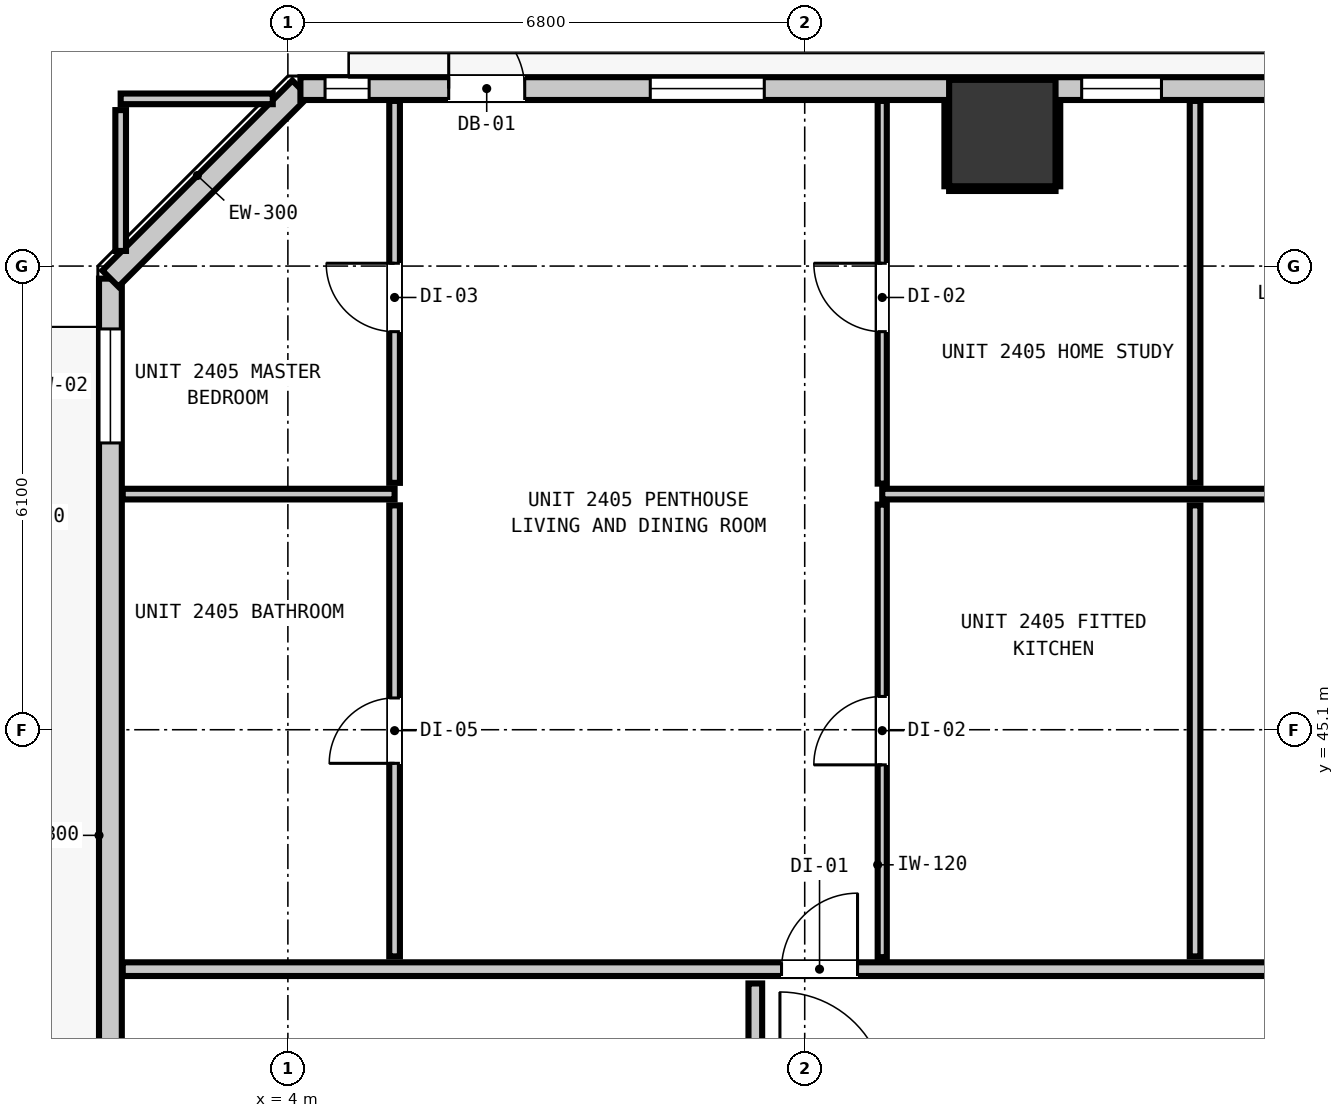
"""IFC4 building model, lengths in metres.
Left out: names, types, materials, properties, quantities, classifications, styles, units other than length and angle.
Written with IfcOpenShell. Run it as: python <this file> out.ifc"""

import sys

from ifc_helpers import new_model, si_unit, direction, frame, frame_2d, origin, origin_2d, place, context, subcontext, project, spatial, rectangle, extrude, element, fill, save


model = new_model("IFC4")
c1 = context("Model", 3, precision=1e-05, world=origin(), true_north=direction((0.0, 1.0)))
c2 = subcontext(c1, "Body", "Model", "MODEL_VIEW")
j1 = project(units=[si_unit("LENGTHUNIT", "METRE"), si_unit("PLANEANGLEUNIT", "RADIAN")], contexts=[c1])
p1 = place(None, origin())
s1 = spatial("IfcSite", under=j1, at=p1, CompositionType="ELEMENT")
p2 = place(p1, origin())
s2 = spatial("IfcBuilding", under=s1, at=p2, CompositionType="ELEMENT")
p3 = place(p2, frame((0.0, 0.0, 85.08)))
s3 = spatial("IfcBuildingStorey", under=s2, at=p3, CompositionType="ELEMENT", Elevation=85.08)
p4 = place(p3, frame((13.4, 52.95, 0.0), z_axis=(0.0, 0.0, 1.0), x_axis=(1.0, 0.0, 0.0)))
e1 = element("IfcColumn", 1, at=p4, inside=s3, PredefinedType="COLUMN", context=c2, shape_type="SweptSolid", body=[
    extrude(rectangle(XDim=1.4, YDim=1.4, at=origin_2d()), origin(), (0.0, 0.0, 1.0), 3.32),
])
p5 = place(p3, frame((1.665, 16.365, 0.0), z_axis=(0.0, 0.0, 1.0), x_axis=(0.0, 1.0, 0.0)))
e2 = element("IfcWall", 2, at=p5, inside=s3, PredefinedType="STANDARD", context=c2, shape_type="SweptSolid", body=[
    extrude(rectangle(XDim=34.67, YDim=0.3, at=frame_2d((17.335, 0.0))), origin(), (0.0, 0.0, 1.0), 2.96),
])
p6 = place(p5, frame((1.251, 0.0, 0.0)))
e3 = element("IfcOpeningElement", 3, at=p6, cuts=e2, PredefinedType="OPENING", context=c2, shape_type="SweptSolid", body=[
    extrude(rectangle(XDim=1.0, YDim=2.15, at=frame_2d((0.5, 1.075))), frame((0.0, 0.16, 0.0), z_axis=(0.0, -1.0, 0.0), x_axis=(1.0, 0.0, 0.0)), (0.0, 0.0, 1.0), 0.32),
])
p7 = place(p5, frame((32.508, 0.0, 0.85)))
e4 = element("IfcOpeningElement", 4, at=p7, cuts=e2, PredefinedType="OPENING", context=c2, shape_type="SweptSolid", body=[
    extrude(rectangle(XDim=1.5, YDim=1.8, at=frame_2d((0.75, 0.9))), frame((0.0, 0.16, 0.0), z_axis=(0.0, -1.0, 0.0), x_axis=(1.0, 0.0, 0.0)), (0.0, 0.0, 1.0), 0.32),
])
p8 = place(p5, frame((8.323, 0.0, 0.85)))
e5 = element("IfcOpeningElement", 5, at=p8, cuts=e2, PredefinedType="OPENING", context=c2, shape_type="SweptSolid", body=[
    extrude(rectangle(XDim=1.5, YDim=1.8, at=frame_2d((0.75, 0.9))), frame((0.0, 0.16, 0.0), z_axis=(0.0, -1.0, 0.0), x_axis=(1.0, 0.0, 0.0)), (0.0, 0.0, 1.0), 0.32),
])
p9 = place(p5, frame((11.473, 0.0, 0.85)))
e6 = element("IfcOpeningElement", 6, at=p9, cuts=e2, PredefinedType="OPENING", context=c2, shape_type="SweptSolid", body=[
    extrude(rectangle(XDim=1.5, YDim=1.8, at=frame_2d((0.75, 0.9))), frame((0.0, 0.16, 0.0), z_axis=(0.0, -1.0, 0.0), x_axis=(1.0, 0.0, 0.0)), (0.0, 0.0, 1.0), 0.32),
])
p10 = place(p5, frame((17.857, 0.0, 0.85)))
e7 = element("IfcOpeningElement", 7, at=p10, cuts=e2, PredefinedType="OPENING", context=c2, shape_type="SweptSolid", body=[
    extrude(rectangle(XDim=1.5, YDim=1.8, at=frame_2d((0.75, 0.9))), frame((0.0, 0.16, 0.0), z_axis=(0.0, -1.0, 0.0), x_axis=(1.0, 0.0, 0.0)), (0.0, 0.0, 1.0), 0.32),
])
p11 = place(p5, frame((21.133, 0.0, 0.85)))
e8 = element("IfcOpeningElement", 8, at=p11, cuts=e2, PredefinedType="OPENING", context=c2, shape_type="SweptSolid", body=[
    extrude(rectangle(XDim=1.05, YDim=1.65, at=frame_2d((0.525, 0.825))), frame((0.0, 0.16, 0.0), z_axis=(0.0, -1.0, 0.0), x_axis=(1.0, 0.0, 0.0)), (0.0, 0.0, 1.0), 0.32),
])
p12 = place(p3, frame((1.665, 51.035, 0.0), z_axis=(0.0, 0.0, 1.0), x_axis=(0.707106781187, 0.707106781187, 0.0)))
e9 = element("IfcWall", 9, at=p12, inside=s3, PredefinedType="STANDARD", context=c2, shape_type="SweptSolid", body=[
    extrude(rectangle(XDim=3.536, YDim=0.3, at=frame_2d((1.768, 0.0))), origin(), (0.0, 0.0, 1.0), 2.96),
])
p13 = place(p3, frame((4.165, 53.535, 0.0), z_axis=(0.0, 0.0, 1.0), x_axis=(1.0, 0.0, 0.0)))
e10 = element("IfcWall", 10, at=p13, inside=s3, PredefinedType="STANDARD", context=c2, shape_type="SweptSolid", body=[
    extrude(rectangle(XDim=37.47, YDim=0.3, at=frame_2d((18.735, 0.0))), origin(), (0.0, 0.0, 1.0), 2.96),
])
p14 = place(p13, frame((1.951, 0.0, 0.0)))
e11 = element("IfcOpeningElement", 11, at=p14, cuts=e10, PredefinedType="OPENING", context=c2, shape_type="SweptSolid", body=[
    extrude(rectangle(XDim=1.0, YDim=2.15, at=frame_2d((0.5, 1.075))), frame((0.0, 0.16, 0.0), z_axis=(0.0, -1.0, 0.0), x_axis=(1.0, 0.0, 0.0)), (0.0, 0.0, 1.0), 0.32),
])
p15 = place(p13, frame((4.603, 0.0, 0.85)))
e12 = element("IfcOpeningElement", 12, at=p15, cuts=e10, PredefinedType="OPENING", context=c2, shape_type="SweptSolid", body=[
    extrude(rectangle(XDim=1.5, YDim=1.8, at=frame_2d((0.75, 0.9))), frame((0.0, 0.16, 0.0), z_axis=(0.0, -1.0, 0.0), x_axis=(1.0, 0.0, 0.0)), (0.0, 0.0, 1.0), 0.32),
])
p16 = place(p13, frame((0.324, 0.0, 0.85)))
e13 = element("IfcOpeningElement", 13, at=p16, cuts=e10, PredefinedType="OPENING", context=c2, shape_type="SweptSolid", body=[
    extrude(rectangle(XDim=0.58, YDim=1.5, at=frame_2d((0.29, 0.75))), frame((0.0, 0.16, 0.0), z_axis=(0.0, -1.0, 0.0), x_axis=(1.0, 0.0, 0.0)), (0.0, 0.0, 1.0), 0.32),
])
p17 = place(p13, frame((10.279, 0.0, 0.85)))
e14 = element("IfcOpeningElement", 14, at=p17, cuts=e10, PredefinedType="OPENING", context=c2, shape_type="SweptSolid", body=[
    extrude(rectangle(XDim=1.05, YDim=1.65, at=frame_2d((0.525, 0.825))), frame((0.0, 0.16, 0.0), z_axis=(0.0, -1.0, 0.0), x_axis=(1.0, 0.0, 0.0)), (0.0, 0.0, 1.0), 0.32),
])
p18 = place(p13, frame((13.154, 0.0, 0.85)))
e15 = element("IfcOpeningElement", 15, at=p18, cuts=e10, PredefinedType="OPENING", context=c2, shape_type="SweptSolid", body=[
    extrude(rectangle(XDim=1.5, YDim=1.8, at=frame_2d((0.75, 0.9))), frame((0.0, 0.16, 0.0), z_axis=(0.0, -1.0, 0.0), x_axis=(1.0, 0.0, 0.0)), (0.0, 0.0, 1.0), 0.32),
])
p19 = place(p13, frame((28.597, 0.0, 0.85)))
e16 = element("IfcOpeningElement", 16, at=p19, cuts=e10, PredefinedType="OPENING", context=c2, shape_type="SweptSolid", body=[
    extrude(rectangle(XDim=1.5, YDim=1.8, at=frame_2d((0.75, 0.9))), frame((0.0, 0.16, 0.0), z_axis=(0.0, -1.0, 0.0), x_axis=(1.0, 0.0, 0.0)), (0.0, 0.0, 1.0), 0.32),
])
p20 = place(p13, frame((26.007, 0.0, 0.85)))
e17 = element("IfcOpeningElement", 17, at=p20, cuts=e10, PredefinedType="OPENING", context=c2, shape_type="SweptSolid", body=[
    extrude(rectangle(XDim=0.58, YDim=1.5, at=frame_2d((0.29, 0.75))), frame((0.0, 0.16, 0.0), z_axis=(0.0, -1.0, 0.0), x_axis=(1.0, 0.0, 0.0)), (0.0, 0.0, 1.0), 0.32),
])
p21 = place(p13, frame((35.682, 0.0, 0.85)))
e18 = element("IfcOpeningElement", 18, at=p21, cuts=e10, PredefinedType="OPENING", context=c2, shape_type="SweptSolid", body=[
    extrude(rectangle(XDim=1.5, YDim=1.8, at=frame_2d((0.75, 0.9))), frame((0.0, 0.16, 0.0), z_axis=(0.0, -1.0, 0.0), x_axis=(1.0, 0.0, 0.0)), (0.0, 0.0, 1.0), 0.32),
])
p22 = place(p3, frame((1.827, 41.95, 0.0), z_axis=(0.0, 0.0, 1.0), x_axis=(1.0, 0.0, 0.0)))
e19 = element("IfcWall", 19, at=p22, inside=s3, PredefinedType="PARTITIONING", context=c2, shape_type="SweptSolid", body=[
    extrude(rectangle(XDim=42.146, YDim=0.18, at=frame_2d((21.073, 0.0))), origin(), (0.0, 0.0, 1.0), 2.96),
])
p23 = place(p22, frame((8.668, 0.0, 0.0)))
e20 = element("IfcOpeningElement", 20, at=p23, cuts=e19, PredefinedType="OPENING", context=c2, shape_type="SweptSolid", body=[
    extrude(rectangle(XDim=1.0, YDim=2.15, at=frame_2d((0.5, 1.075))), frame((0.0, 0.1, 0.0), z_axis=(0.0, -1.0, 0.0), x_axis=(1.0, 0.0, 0.0)), (0.0, 0.0, 1.0), 0.2),
])
p24 = place(p22, frame((17.902, 0.0, 0.0)))
e21 = element("IfcOpeningElement", 21, at=p24, cuts=e19, PredefinedType="OPENING", context=c2, shape_type="SweptSolid", body=[
    extrude(rectangle(XDim=1.0, YDim=2.15, at=frame_2d((0.5, 1.075))), frame((0.0, 0.1, 0.0), z_axis=(0.0, -1.0, 0.0), x_axis=(1.0, 0.0, 0.0)), (0.0, 0.0, 1.0), 0.2),
])
p25 = place(p22, frame((33.01, 0.0, 0.0)))
e22 = element("IfcOpeningElement", 22, at=p25, cuts=e19, PredefinedType="OPENING", context=c2, shape_type="SweptSolid", body=[
    extrude(rectangle(XDim=1.0, YDim=2.15, at=frame_2d((0.5, 1.075))), frame((0.0, 0.1, 0.0), z_axis=(0.0, -1.0, 0.0), x_axis=(1.0, 0.0, 0.0)), (0.0, 0.0, 1.0), 0.2),
])
p26 = place(p3, frame((1.827, 48.2, 0.0), z_axis=(0.0, 0.0, 1.0), x_axis=(1.0, 0.0, 0.0)))
e23 = element("IfcWall", 23, at=p26, inside=s3, PredefinedType="PARTITIONING", context=c2, shape_type="SweptSolid", body=[
    extrude(rectangle(XDim=3.577, YDim=0.14, at=frame_2d((1.789, 0.0))), origin(), (0.0, 0.0, 1.0), 2.96),
])
p27 = place(p3, frame((11.82, 48.2, 0.0), z_axis=(0.0, 0.0, 1.0), x_axis=(1.0, 0.0, 0.0)))
e24 = element("IfcWall", 24, at=p27, inside=s3, PredefinedType="PARTITIONING", context=c2, shape_type="SweptSolid", body=[
    extrude(rectangle(XDim=32.153, YDim=0.14, at=frame_2d((16.076, 0.0))), origin(), (0.0, 0.0, 1.0), 2.96),
])
p28 = place(p27, frame((7.959, 0.0, 0.0)))
e25 = element("IfcOpeningElement", 25, at=p28, cuts=e24, PredefinedType="OPENING", context=c2, shape_type="SweptSolid", body=[
    extrude(rectangle(XDim=0.9, YDim=2.1, at=frame_2d((0.45, 1.05))), frame((0.0, 0.08, 0.0), z_axis=(0.0, -1.0, 0.0), x_axis=(1.0, 0.0, 0.0)), (0.0, 0.0, 1.0), 0.16),
])
p29 = place(p27, frame((23.067, 0.0, 0.0)))
e26 = element("IfcOpeningElement", 26, at=p29, cuts=e24, PredefinedType="OPENING", context=c2, shape_type="SweptSolid", body=[
    extrude(rectangle(XDim=0.9, YDim=2.1, at=frame_2d((0.45, 1.05))), frame((0.0, 0.08, 0.0), z_axis=(0.0, -1.0, 0.0), x_axis=(1.0, 0.0, 0.0)), (0.0, 0.0, 1.0), 0.16),
])
p30 = place(p3, frame((1.8, 53.4, 0.0), z_axis=(0.0, 0.0, 1.0), x_axis=(1.0, 0.0, 0.0)))
e27 = element("IfcWall", 27, at=p30, inside=s3, PredefinedType="PARTITIONING", context=c2, shape_type="SweptSolid", body=[
    extrude(rectangle(XDim=2.001, YDim=0.14, at=frame_2d((1.0, 0.0))), origin(), (0.0, 0.0, 1.0), 2.96),
])
p31 = place(p3, frame((10.15, 40.438, 0.0), z_axis=(0.0, 0.0, 1.0), x_axis=(0.0, 1.0, 0.0)))
e28 = element("IfcWall", 28, at=p31, inside=s3, PredefinedType="PARTITIONING", context=c2, shape_type="SweptSolid", body=[
    extrude(rectangle(XDim=1.324, YDim=0.18, at=frame_2d((0.662, 0.0))), origin(), (0.0, 0.0, 1.0), 2.96),
])
p32 = place(p3, frame((1.8, 51.399, 0.0), z_axis=(0.0, 0.0, 1.0), x_axis=(0.0, 1.0, 0.0)))
e29 = element("IfcWall", 29, at=p32, inside=s3, PredefinedType="PARTITIONING", context=c2, shape_type="SweptSolid", body=[
    extrude(rectangle(XDim=1.853, YDim=0.14, at=frame_2d((0.927, 0.0))), origin(), (0.0, 0.0, 1.0), 2.96),
])
p33 = place(p3, frame((5.404, 42.118, 0.0), z_axis=(0.0, 0.0, 1.0), x_axis=(0.0, 1.0, 0.0)))
e30 = element("IfcWall", 30, at=p33, inside=s3, PredefinedType="PARTITIONING", context=c2, shape_type="SweptSolid", body=[
    extrude(rectangle(XDim=5.934, YDim=0.14, at=frame_2d((2.967, 0.0))), origin(), (0.0, 0.0, 1.0), 2.96),
])
p34 = place(p33, frame((2.54, 0.0, 0.0)))
e31 = element("IfcOpeningElement", 31, at=p34, cuts=e30, PredefinedType="OPENING", context=c2, shape_type="SweptSolid", body=[
    extrude(rectangle(XDim=0.86, YDim=2.02, at=frame_2d((0.43, 1.01))), frame((0.0, 0.08, 0.0), z_axis=(0.0, -1.0, 0.0), x_axis=(1.0, 0.0, 0.0)), (0.0, 0.0, 1.0), 0.16),
])
p35 = place(p3, frame((5.404, 48.348, 0.0), z_axis=(0.0, 0.0, 1.0), x_axis=(0.0, 1.0, 0.0)))
e32 = element("IfcWall", 32, at=p35, inside=s3, PredefinedType="PARTITIONING", context=c2, shape_type="SweptSolid", body=[
    extrude(rectangle(XDim=5.025, YDim=0.14, at=frame_2d((2.513, 0.0))), origin(), (0.0, 0.0, 1.0), 2.96),
])
p36 = place(p35, frame((1.989, 0.0, 0.0)))
e33 = element("IfcOpeningElement", 33, at=p36, cuts=e32, PredefinedType="OPENING", context=c2, shape_type="SweptSolid", body=[
    extrude(rectangle(XDim=0.9, YDim=2.1, at=frame_2d((0.45, 1.05))), frame((0.0, 0.08, 0.0), z_axis=(0.0, -1.0, 0.0), x_axis=(1.0, 0.0, 0.0)), (0.0, 0.0, 1.0), 0.16),
])
p37 = place(p3, frame((15.936, 42.118, 0.0), z_axis=(0.0, 0.0, 1.0), x_axis=(0.0, 1.0, 0.0)))
e34 = element("IfcWall", 34, at=p37, inside=s3, PredefinedType="PARTITIONING", context=c2, shape_type="SweptSolid", body=[
    extrude(rectangle(XDim=5.934, YDim=0.14, at=frame_2d((2.967, 0.0))), origin(), (0.0, 0.0, 1.0), 2.96),
])
p38 = place(p3, frame((15.936, 48.348, 0.0), z_axis=(0.0, 0.0, 1.0), x_axis=(0.0, 1.0, 0.0)))
e35 = element("IfcWall", 35, at=p38, inside=s3, PredefinedType="PARTITIONING", context=c2, shape_type="SweptSolid", body=[
    extrude(rectangle(XDim=5.025, YDim=0.14, at=frame_2d((2.513, 0.0))), origin(), (0.0, 0.0, 1.0), 2.96),
])
p39 = place(p3, frame((11.82, 42.108, 0.0), z_axis=(0.0, 0.0, 1.0), x_axis=(0.0, 1.0, 0.0)))
e36 = element("IfcWall", 36, at=p39, inside=s3, PredefinedType="PARTITIONING", context=c2, shape_type="SweptSolid", body=[
    extrude(rectangle(XDim=5.954, YDim=0.12, at=frame_2d((2.977, 0.0))), origin(), (0.0, 0.0, 1.0), 2.96),
])
p40 = place(p39, frame((2.53, 0.0, 0.0)))
e37 = element("IfcOpeningElement", 37, at=p40, cuts=e36, PredefinedType="OPENING", context=c2, shape_type="SweptSolid", body=[
    extrude(rectangle(XDim=0.9, YDim=2.1, at=frame_2d((0.45, 1.05))), frame((0.0, 0.07, 0.0), z_axis=(0.0, -1.0, 0.0), x_axis=(1.0, 0.0, 0.0)), (0.0, 0.0, 1.0), 0.14),
])
p41 = place(p3, frame((11.82, 48.338, 0.0), z_axis=(0.0, 0.0, 1.0), x_axis=(0.0, 1.0, 0.0)))
e38 = element("IfcWall", 38, at=p41, inside=s3, PredefinedType="PARTITIONING", context=c2, shape_type="SweptSolid", body=[
    extrude(rectangle(XDim=5.035, YDim=0.12, at=frame_2d((2.518, 0.0))), origin(), (0.0, 0.0, 1.0), 2.96),
])
p42 = place(p41, frame((1.999, 0.0, 0.0)))
e39 = element("IfcOpeningElement", 39, at=p42, cuts=e38, PredefinedType="OPENING", context=c2, shape_type="SweptSolid", body=[
    extrude(rectangle(XDim=0.9, YDim=2.1, at=frame_2d((0.45, 1.05))), frame((0.0, 0.07, 0.0), z_axis=(0.0, -1.0, 0.0), x_axis=(1.0, 0.0, 0.0)), (0.0, 0.0, 1.0), 0.14),
])
p43 = place(p3, frame((12.7, 52.218, 0.0), z_axis=(0.0, 0.0, 1.0), x_axis=(1.0, 0.0, 0.0)))
e40 = element("IfcWall", 40, at=p43, inside=s3, PredefinedType="PARTITIONING", context=c2, shape_type="SweptSolid", body=[
    extrude(rectangle(XDim=1.4, YDim=0.06, at=frame_2d((0.7, 0.0))), origin(), (0.0, 0.0, 1.0), 1.45),
])
for number, where, z_axis, x_axis in (
    (41, (12.668, 52.25, 0.0), (0.0, 0.0, 1.0), (0.0, 1.0, 0.0)),
    (42, (14.132, 52.25, 0.0), (0.0, 0.0, 1.0), (0.0, 1.0, 0.0)),
):
    element("IfcWall", number, at=place(p3, frame(where, z_axis=z_axis, x_axis=x_axis)), inside=s3, PredefinedType="PARTITIONING", context=c2, shape_type="SweptSolid", body=[
        extrude(rectangle(XDim=1.12, YDim=0.06, at=frame_2d((0.56, 0.0))), origin(), (0.0, 0.0, 1.0), 1.45),
    ])
p44 = place(p14, origin())
e43 = element("IfcDoor", 43, at=p44, inside=s3, OperationType="SINGLE_SWING_LEFT", PredefinedType="DOOR", context=c2, shape_type="SweptSolid", body=[
    extrude(rectangle(XDim=1.0, YDim=2.15, at=frame_2d((0.5, 1.075))), frame((0.0, 0.025, 0.0), z_axis=(0.0, -1.0, 0.0), x_axis=(1.0, 0.0, 0.0)), (0.0, 0.0, 1.0), 0.05),
])
fill(e11, e43)
p45 = place(p7, origin())
e44 = element("IfcWindow", 44, at=p45, inside=s3, PartitioningType="SINGLE_PANEL", PredefinedType="WINDOW", context=c2, shape_type="SweptSolid", body=[
    extrude(rectangle(XDim=1.5, YDim=1.8, at=frame_2d((0.75, 0.9))), frame((0.0, 0.03, 0.0), z_axis=(0.0, -1.0, 0.0), x_axis=(1.0, 0.0, 0.0)), (0.0, 0.0, 1.0), 0.06),
])
fill(e4, e44)
p46 = place(p15, origin())
e45 = element("IfcWindow", 45, at=p46, inside=s3, PartitioningType="SINGLE_PANEL", PredefinedType="WINDOW", context=c2, shape_type="SweptSolid", body=[
    extrude(rectangle(XDim=1.5, YDim=1.8, at=frame_2d((0.75, 0.9))), frame((0.0, 0.03, 0.0), z_axis=(0.0, -1.0, 0.0), x_axis=(1.0, 0.0, 0.0)), (0.0, 0.0, 1.0), 0.06),
])
fill(e12, e45)
p47 = place(p16, origin())
e46 = element("IfcWindow", 46, at=p47, inside=s3, PartitioningType="SINGLE_PANEL", PredefinedType="WINDOW", context=c2, shape_type="SweptSolid", body=[
    extrude(rectangle(XDim=0.58, YDim=1.5, at=frame_2d((0.29, 0.75))), frame((0.0, 0.03, 0.0), z_axis=(0.0, -1.0, 0.0), x_axis=(1.0, 0.0, 0.0)), (0.0, 0.0, 1.0), 0.06),
])
fill(e13, e46)
p48 = place(p17, origin())
e47 = element("IfcWindow", 47, at=p48, inside=s3, PartitioningType="SINGLE_PANEL", PredefinedType="WINDOW", context=c2, shape_type="SweptSolid", body=[
    extrude(rectangle(XDim=1.05, YDim=1.65, at=frame_2d((0.525, 0.825))), frame((0.0, 0.03, 0.0), z_axis=(0.0, -1.0, 0.0), x_axis=(1.0, 0.0, 0.0)), (0.0, 0.0, 1.0), 0.06),
])
fill(e14, e47)
p49 = place(p23, origin())
e48 = element("IfcDoor", 48, at=p49, inside=s3, OperationType="SINGLE_SWING_RIGHT", PredefinedType="DOOR", context=c2, shape_type="SweptSolid", body=[
    extrude(rectangle(XDim=1.0, YDim=2.15, at=frame_2d((0.5, 1.075))), frame((0.0, 0.025, 0.0), z_axis=(0.0, -1.0, 0.0), x_axis=(1.0, 0.0, 0.0)), (0.0, 0.0, 1.0), 0.05),
])
fill(e20, e48)
p50 = place(p34, origin())
e49 = element("IfcDoor", 49, at=p50, inside=s3, OperationType="SINGLE_SWING_LEFT", PredefinedType="DOOR", context=c2, shape_type="SweptSolid", body=[
    extrude(rectangle(XDim=0.86, YDim=2.02, at=frame_2d((0.43, 1.01))), frame((0.0, 0.025, 0.0), z_axis=(0.0, -1.0, 0.0), x_axis=(1.0, 0.0, 0.0)), (0.0, 0.0, 1.0), 0.05),
])
fill(e31, e49)
p51 = place(p36, origin())
e50 = element("IfcDoor", 50, at=p51, inside=s3, OperationType="SINGLE_SWING_RIGHT", PredefinedType="DOOR", context=c2, shape_type="SweptSolid", body=[
    extrude(rectangle(XDim=0.9, YDim=2.1, at=frame_2d((0.45, 1.05))), frame((0.0, 0.025, 0.0), z_axis=(0.0, -1.0, 0.0), x_axis=(1.0, 0.0, 0.0)), (0.0, 0.0, 1.0), 0.05),
])
fill(e33, e50)
p52 = place(p40, origin())
e51 = element("IfcDoor", 51, at=p52, inside=s3, OperationType="SINGLE_SWING_LEFT", PredefinedType="DOOR", context=c2, shape_type="SweptSolid", body=[
    extrude(rectangle(XDim=0.9, YDim=2.1, at=frame_2d((0.45, 1.05))), frame((0.0, 0.025, 0.0), z_axis=(0.0, -1.0, 0.0), x_axis=(1.0, 0.0, 0.0)), (0.0, 0.0, 1.0), 0.05),
])
fill(e37, e51)
p53 = place(p42, origin())
e52 = element("IfcDoor", 52, at=p53, inside=s3, OperationType="SINGLE_SWING_RIGHT", PredefinedType="DOOR", context=c2, shape_type="SweptSolid", body=[
    extrude(rectangle(XDim=0.9, YDim=2.1, at=frame_2d((0.45, 1.05))), frame((0.0, 0.025, 0.0), z_axis=(0.0, -1.0, 0.0), x_axis=(1.0, 0.0, 0.0)), (0.0, 0.0, 1.0), 0.05),
])
fill(e39, e52)
save(model, sys.argv[1])
